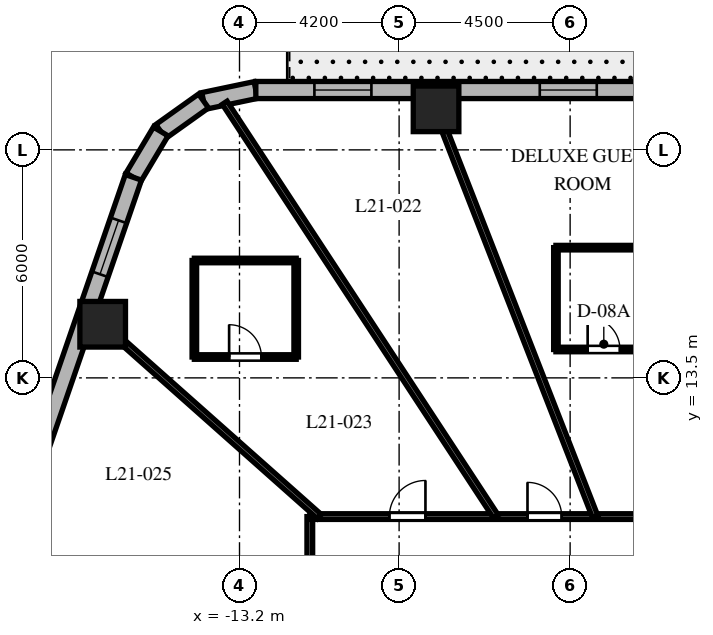
"""IFC4 building model, lengths in metres.
Left out: names, types, materials, properties, quantities, classifications, styles, units other than length and angle.
Written with IfcOpenShell. Run it as: python <this file> out.ifc"""

import sys

from ifc_helpers import new_model, si_unit, direction, frame, frame_2d, origin, origin_2d, place, context, subcontext, project, spatial, rectangle, extrude, element, fill, save


model = new_model("IFC4")
c1 = context("Model", 3, precision=1e-05, world=origin(), true_north=direction((0.0, 1.0)))
c2 = subcontext(c1, "Body", "Model", "MODEL_VIEW")
j1 = project(units=[si_unit("LENGTHUNIT", "METRE"), si_unit("PLANEANGLEUNIT", "RADIAN")], contexts=[c1])
p1 = place(None, origin())
s1 = spatial("IfcSite", under=j1, at=p1, CompositionType="ELEMENT")
p2 = place(p1, origin())
s2 = spatial("IfcBuilding", under=s1, at=p2, CompositionType="ELEMENT")
p3 = place(p2, frame((0.0, 0.0, 91.4)))
s3 = spatial("IfcBuildingStorey", under=s2, at=p3, CompositionType="ELEMENT", Elevation=91.4)
for number, where, z_axis, x_axis in (
    (1, (-8.028, 20.58, 0.0), (0.0, 0.0, 1.0), (1.0, 0.0, 0.0)),
    (2, (-16.8, 14.911, 0.0), (0.0, 0.0, 1.0), (1.0, 0.0, 0.0)),
):
    element("IfcColumn", number, at=place(p3, frame(where, z_axis=z_axis, x_axis=x_axis)), inside=s3, PredefinedType="COLUMN", context=c2, shape_type="SweptSolid", body=[
        extrude(rectangle(XDim=1.2, YDim=1.2, at=origin_2d()), origin(), (0.0, 0.0, 1.0), 3.7),
    ])
p4 = place(p3, frame((-12.771, 21.075, 0.0), z_axis=(0.0, 0.0, 1.0), x_axis=(-0.97874281988, -0.205091424819, 0.0)))
e3 = element("IfcWall", 3, at=p4, inside=s3, PredefinedType="SOLIDWALL", context=c2, shape_type="SweptSolid", body=[
    extrude(rectangle(XDim=1.406, YDim=0.45, at=frame_2d((0.703, 0.0))), origin(), (0.0, 0.0, 1.0), 3.4),
])
p5 = place(p3, frame((-14.146, 20.787, 0.0), z_axis=(0.0, 0.0, 1.0), x_axis=(-0.814162929117, -0.580636482536, 0.0)))
e4 = element("IfcWall", 4, at=p5, inside=s3, PredefinedType="SOLIDWALL", context=c2, shape_type="SweptSolid", body=[
    extrude(rectangle(XDim=1.382, YDim=0.45, at=frame_2d((0.691, 0.0))), origin(), (0.0, 0.0, 1.0), 3.4),
])
p6 = place(p3, frame((-15.272, 19.984, 0.0), z_axis=(0.0, 0.0, 1.0), x_axis=(-0.512579347361, -0.858639862025, 0.0)))
e5 = element("IfcWall", 5, at=p6, inside=s3, PredefinedType="SOLIDWALL", context=c2, shape_type="SweptSolid", body=[
    extrude(rectangle(XDim=1.406, YDim=0.45, at=frame_2d((0.703, 0.0))), origin(), (0.0, 0.0, 1.0), 3.4),
])
p7 = place(p3, frame((11.012, 21.075, 0.0), z_axis=(0.0, 0.0, 1.0), x_axis=(-1.0, 0.0, 0.0)))
e6 = element("IfcWall", 6, at=p7, inside=s3, PredefinedType="SOLIDWALL", context=c2, shape_type="SweptSolid", body=[
    extrude(rectangle(XDim=23.782, YDim=0.45, at=frame_2d((11.891, 0.0))), origin(), (0.0, 0.0, 1.0), 3.4),
])
p8 = place(p7, frame((2.473, 0.0, 0.0)))
e7 = element("IfcOpeningElement", 7, at=p8, cuts=e6, PredefinedType="OPENING", context=c2, shape_type="SweptSolid", body=[
    extrude(rectangle(XDim=0.95, YDim=2.15, at=frame_2d((0.475, 1.075))), frame((0.0, 0.235, 0.0), z_axis=(0.0, -1.0, 0.0), x_axis=(1.0, 0.0, 0.0)), (0.0, 0.0, 1.0), 0.47),
])
p9 = place(p7, frame((8.244, 0.0, 0.8)))
e8 = element("IfcOpeningElement", 8, at=p9, cuts=e6, PredefinedType="OPENING", context=c2, shape_type="SweptSolid", body=[
    extrude(rectangle(XDim=1.5, YDim=1.8, at=frame_2d((0.75, 0.9))), frame((0.0, 0.235, 0.0), z_axis=(0.0, -1.0, 0.0), x_axis=(1.0, 0.0, 0.0)), (0.0, 0.0, 1.0), 0.47),
])
p10 = place(p7, frame((14.811, 0.0, 0.8)))
e9 = element("IfcOpeningElement", 9, at=p10, cuts=e6, PredefinedType="OPENING", context=c2, shape_type="SweptSolid", body=[
    extrude(rectangle(XDim=1.5, YDim=1.8, at=frame_2d((0.75, 0.9))), frame((0.0, 0.235, 0.0), z_axis=(0.0, -1.0, 0.0), x_axis=(1.0, 0.0, 0.0)), (0.0, 0.0, 1.0), 0.47),
])
p11 = place(p7, frame((20.741, 0.0, 0.8)))
e10 = element("IfcOpeningElement", 10, at=p11, cuts=e6, PredefinedType="OPENING", context=c2, shape_type="SweptSolid", body=[
    extrude(rectangle(XDim=1.5, YDim=1.8, at=frame_2d((0.75, 0.9))), frame((0.0, 0.235, 0.0), z_axis=(0.0, -1.0, 0.0), x_axis=(1.0, 0.0, 0.0)), (0.0, 0.0, 1.0), 0.47),
])
p12 = place(p3, frame((-15.992, 18.777, 0.0), z_axis=(0.0, 0.0, 1.0), x_axis=(-0.325606988926, -0.945505202927, 0.0)))
e11 = element("IfcWall", 11, at=p12, inside=s3, PredefinedType="SOLIDWALL", context=c2, shape_type="SweptSolid", body=[
    extrude(rectangle(XDim=19.669, YDim=0.45, at=frame_2d((9.835, 0.0))), origin(), (0.0, 0.0, 1.0), 3.4),
])
p13 = place(p12, frame((1.197, 0.0, 0.8)))
e12 = element("IfcOpeningElement", 12, at=p13, cuts=e11, PredefinedType="OPENING", context=c2, shape_type="SweptSolid", body=[
    extrude(rectangle(XDim=1.5, YDim=1.8, at=frame_2d((0.75, 0.9))), frame((0.0, 0.235, 0.0), z_axis=(0.0, -1.0, 0.0), x_axis=(1.0, 0.0, 0.0)), (0.0, 0.0, 1.0), 0.47),
])
p14 = place(p12, frame((9.03, 0.0, 0.8)))
e13 = element("IfcOpeningElement", 13, at=p14, cuts=e11, PredefinedType="OPENING", context=c2, shape_type="SweptSolid", body=[
    extrude(rectangle(XDim=1.5, YDim=1.8, at=frame_2d((0.75, 0.9))), frame((0.0, 0.235, 0.0), z_axis=(0.0, -1.0, 0.0), x_axis=(1.0, 0.0, 0.0)), (0.0, 0.0, 1.0), 0.47),
])
p15 = place(p12, frame((16.918, 0.0, 0.8)))
e14 = element("IfcOpeningElement", 14, at=p15, cuts=e11, PredefinedType="OPENING", context=c2, shape_type="SweptSolid", body=[
    extrude(rectangle(XDim=1.5, YDim=1.8, at=frame_2d((0.75, 0.9))), frame((0.0, 0.235, 0.0), z_axis=(0.0, -1.0, 0.0), x_axis=(1.0, 0.0, 0.0)), (0.0, 0.0, 1.0), 0.47),
])
p16 = place(p3, frame((-11.35, -9.85, 0.0), z_axis=(0.0, 0.0, 1.0), x_axis=(0.0, 1.0, 0.0)))
e15 = element("IfcWall", 15, at=p16, inside=s3, PredefinedType="PARTITIONING", context=c2, shape_type="SweptSolid", body=[
    extrude(rectangle(XDim=19.7, YDim=0.15, at=frame_2d((9.85, 0.0))), origin(), (0.0, 0.0, 1.0), 2.84),
])
p17 = place(p16, frame((15.205, 0.0, 0.0)))
e16 = element("IfcOpeningElement", 16, at=p17, cuts=e15, PredefinedType="OPENING", context=c2, shape_type="SweptSolid", body=[
    extrude(rectangle(XDim=0.95, YDim=2.03, at=frame_2d((0.475, 1.015))), frame((0.0, 0.085, 0.0), z_axis=(0.0, -1.0, 0.0), x_axis=(1.0, 0.0, 0.0)), (0.0, 0.0, 1.0), 0.17),
])
p18 = place(p16, frame((8.836, 0.0, 0.0)))
e17 = element("IfcOpeningElement", 17, at=p18, cuts=e15, PredefinedType="OPENING", context=c2, shape_type="SweptSolid", body=[
    extrude(rectangle(XDim=0.95, YDim=2.03, at=frame_2d((0.475, 1.015))), frame((0.0, 0.085, 0.0), z_axis=(0.0, -1.0, 0.0), x_axis=(1.0, 0.0, 0.0)), (0.0, 0.0, 1.0), 0.17),
])
p19 = place(p16, frame((4.714, 0.0, 0.0)))
e18 = element("IfcOpeningElement", 18, at=p19, cuts=e15, PredefinedType="OPENING", context=c2, shape_type="SweptSolid", body=[
    extrude(rectangle(XDim=0.9, YDim=2.03, at=frame_2d((0.45, 1.015))), frame((0.0, 0.085, 0.0), z_axis=(0.0, -1.0, 0.0), x_axis=(1.0, 0.0, 0.0)), (0.0, 0.0, 1.0), 0.17),
])
p20 = place(p16, frame((1.462, 0.0, 0.0)))
e19 = element("IfcOpeningElement", 19, at=p20, cuts=e15, PredefinedType="OPENING", context=c2, shape_type="SweptSolid", body=[
    extrude(rectangle(XDim=0.95, YDim=2.03, at=frame_2d((0.475, 1.015))), frame((0.0, 0.085, 0.0), z_axis=(0.0, -1.0, 0.0), x_axis=(1.0, 0.0, 0.0)), (0.0, 0.0, 1.0), 0.17),
])
p21 = place(p3, frame((-11.35, 9.85, 0.0), z_axis=(0.0, 0.0, 1.0), x_axis=(1.0, 0.0, 0.0)))
e20 = element("IfcWall", 20, at=p21, inside=s3, PredefinedType="PARTITIONING", context=c2, shape_type="SweptSolid", body=[
    extrude(rectangle(XDim=22.7, YDim=0.15, at=frame_2d((11.35, 0.0))), origin(), (0.0, 0.0, 1.0), 2.84),
])
p22 = place(p21, frame((18.679, 0.0, 0.0)))
e21 = element("IfcOpeningElement", 21, at=p22, cuts=e20, PredefinedType="OPENING", context=c2, shape_type="SweptSolid", body=[
    extrude(rectangle(XDim=0.9, YDim=2.03, at=frame_2d((0.45, 1.015))), frame((0.0, 0.085, 0.0), z_axis=(0.0, -1.0, 0.0), x_axis=(1.0, 0.0, 0.0)), (0.0, 0.0, 1.0), 0.17),
])
p23 = place(p21, frame((15.337, 0.0, 0.0)))
e22 = element("IfcOpeningElement", 22, at=p23, cuts=e20, PredefinedType="OPENING", context=c2, shape_type="SweptSolid", body=[
    extrude(rectangle(XDim=0.9, YDim=2.03, at=frame_2d((0.45, 1.015))), frame((0.0, 0.085, 0.0), z_axis=(0.0, -1.0, 0.0), x_axis=(1.0, 0.0, 0.0)), (0.0, 0.0, 1.0), 0.17),
])
p24 = place(p21, frame((11.994, 0.0, 0.0)))
e23 = element("IfcOpeningElement", 23, at=p24, cuts=e20, PredefinedType="OPENING", context=c2, shape_type="SweptSolid", body=[
    extrude(rectangle(XDim=0.95, YDim=2.03, at=frame_2d((0.475, 1.015))), frame((0.0, 0.085, 0.0), z_axis=(0.0, -1.0, 0.0), x_axis=(1.0, 0.0, 0.0)), (0.0, 0.0, 1.0), 0.17),
])
p25 = place(p21, frame((8.559, 0.0, 0.0)))
e24 = element("IfcOpeningElement", 24, at=p25, cuts=e20, PredefinedType="OPENING", context=c2, shape_type="SweptSolid", body=[
    extrude(rectangle(XDim=0.95, YDim=2.03, at=frame_2d((0.475, 1.015))), frame((0.0, 0.085, 0.0), z_axis=(0.0, -1.0, 0.0), x_axis=(1.0, 0.0, 0.0)), (0.0, 0.0, 1.0), 0.17),
])
p26 = place(p21, frame((5.728, 0.0, 0.0)))
e25 = element("IfcOpeningElement", 25, at=p26, cuts=e20, PredefinedType="OPENING", context=c2, shape_type="SweptSolid", body=[
    extrude(rectangle(XDim=0.9, YDim=2.03, at=frame_2d((0.45, 1.015))), frame((0.0, 0.085, 0.0), z_axis=(0.0, -1.0, 0.0), x_axis=(1.0, 0.0, 0.0)), (0.0, 0.0, 1.0), 0.17),
])
p27 = place(p21, frame((2.093, 0.0, 0.0)))
e26 = element("IfcOpeningElement", 26, at=p27, cuts=e20, PredefinedType="OPENING", context=c2, shape_type="SweptSolid", body=[
    extrude(rectangle(XDim=0.95, YDim=2.03, at=frame_2d((0.475, 1.015))), frame((0.0, 0.085, 0.0), z_axis=(0.0, -1.0, 0.0), x_axis=(1.0, 0.0, 0.0)), (0.0, 0.0, 1.0), 0.17),
])
p28 = place(p3, frame((-3.842, 9.85, 0.0), z_axis=(0.0, 0.0, 1.0), x_axis=(-0.363432685593, 0.931620460833, 0.0)))
e27 = element("IfcWall", 27, at=p28, inside=s3, PredefinedType="PARTITIONING", context=c2, shape_type="SweptSolid", body=[
    extrude(rectangle(XDim=12.049, YDim=0.15, at=frame_2d((6.024, 0.0))), origin(), (0.0, 0.0, 1.0), 2.54),
])
p29 = place(p3, frame((-6.454, 9.85, 0.0), z_axis=(0.0, 0.0, 1.0), x_axis=(-0.548052950111, 0.836443640584, 0.0)))
e28 = element("IfcWall", 28, at=p29, inside=s3, PredefinedType="PARTITIONING", context=c2, shape_type="SweptSolid", body=[
    extrude(rectangle(XDim=13.019, YDim=0.15, at=frame_2d((6.51, 0.0))), origin(), (0.0, 0.0, 1.0), 2.54),
])
p30 = place(p3, frame((-11.098, 9.85, 0.0), z_axis=(0.0, 0.0, 1.0), x_axis=(-0.747904295103, 0.663806572253, 0.0)))
e29 = element("IfcWall", 29, at=p30, inside=s3, PredefinedType="PARTITIONING", context=c2, shape_type="SweptSolid", body=[
    extrude(rectangle(XDim=8.16, YDim=0.15, at=frame_2d((4.08, 0.0))), origin(), (0.0, 0.0, 1.0), 2.54),
])
p31 = place(p3, frame((-4.874, 14.247, 0.0), z_axis=(0.0, 0.0, 1.0), x_axis=(1.0, 0.0, 0.0)))
e30 = element("IfcWall", 30, at=p31, inside=s3, PredefinedType="PARTITIONING", context=c2, shape_type="SweptSolid", body=[
    extrude(rectangle(XDim=2.52, YDim=0.12, at=frame_2d((1.26, 0.0))), origin(), (0.0, 0.0, 1.0), 3.4),
])
p32 = place(p31, frame((0.835, 0.0, 0.0)))
e31 = element("IfcOpeningElement", 31, at=p32, cuts=e30, PredefinedType="OPENING", context=c2, shape_type="SweptSolid", body=[
    extrude(rectangle(XDim=0.85, YDim=2.03, at=frame_2d((0.425, 1.015))), frame((0.0, 0.07, 0.0), z_axis=(0.0, -1.0, 0.0), x_axis=(1.0, 0.0, 0.0)), (0.0, 0.0, 1.0), 0.14),
])
p33 = place(p3, frame((-2.354, 16.927, 0.0), z_axis=(0.0, 0.0, 1.0), x_axis=(-1.0, 0.0, 0.0)))
e32 = element("IfcWall", 32, at=p33, inside=s3, PredefinedType="PARTITIONING", context=c2, shape_type="SweptSolid", body=[
    extrude(rectangle(XDim=2.52, YDim=0.12, at=frame_2d((1.26, 0.0))), origin(), (0.0, 0.0, 1.0), 3.4),
])
p34 = place(p3, frame((-4.874, 16.927, 0.0), z_axis=(0.0, 0.0, 1.0), x_axis=(0.0, -1.0, 0.0)))
e33 = element("IfcWall", 33, at=p34, inside=s3, PredefinedType="PARTITIONING", context=c2, shape_type="SweptSolid", body=[
    extrude(rectangle(XDim=2.68, YDim=0.12, at=frame_2d((1.34, 0.0))), origin(), (0.0, 0.0, 1.0), 2.841),
])
p35 = place(p3, frame((-14.388, 14.049, 0.0), z_axis=(0.0, 0.0, 1.0), x_axis=(1.0, 0.0, 0.0)))
e34 = element("IfcWall", 34, at=p35, inside=s3, PredefinedType="PARTITIONING", context=c2, shape_type="SweptSolid", body=[
    extrude(rectangle(XDim=2.68, YDim=0.12, at=frame_2d((1.34, 0.0))), origin(), (0.0, 0.0, 1.0), 2.927),
])
p36 = place(p35, frame((0.915, 0.0, 0.0)))
e35 = element("IfcOpeningElement", 35, at=p36, cuts=e34, PredefinedType="OPENING", context=c2, shape_type="SweptSolid", body=[
    extrude(rectangle(XDim=0.85, YDim=2.03, at=frame_2d((0.425, 1.015))), frame((0.0, 0.07, 0.0), z_axis=(0.0, -1.0, 0.0), x_axis=(1.0, 0.0, 0.0)), (0.0, 0.0, 1.0), 0.14),
])
p37 = place(p3, frame((-11.708, 14.049, 0.0), z_axis=(0.0, 0.0, 1.0), x_axis=(0.0, 1.0, 0.0)))
e36 = element("IfcWall", 36, at=p37, inside=s3, PredefinedType="PARTITIONING", context=c2, shape_type="SweptSolid", body=[
    extrude(rectangle(XDim=2.54, YDim=0.12, at=frame_2d((1.27, 0.0))), origin(), (0.0, 0.0, 1.0), 2.927),
])
p38 = place(p3, frame((-11.708, 16.589, 0.0), z_axis=(0.0, 0.0, 1.0), x_axis=(-1.0, 0.0, 0.0)))
e37 = element("IfcWall", 37, at=p38, inside=s3, PredefinedType="PARTITIONING", context=c2, shape_type="SweptSolid", body=[
    extrude(rectangle(XDim=2.68, YDim=0.12, at=frame_2d((1.34, 0.0))), origin(), (0.0, 0.0, 1.0), 2.54),
])
p39 = place(p3, frame((-14.388, 16.589, 0.0), z_axis=(0.0, 0.0, 1.0), x_axis=(0.0, -1.0, 0.0)))
e38 = element("IfcWall", 38, at=p39, inside=s3, PredefinedType="PARTITIONING", context=c2, shape_type="SweptSolid", body=[
    extrude(rectangle(XDim=2.54, YDim=0.12, at=frame_2d((1.27, 0.0))), origin(), (0.0, 0.0, 1.0), 2.54),
])
p40 = place(p10, origin())
e39 = element("IfcWindow", 39, at=p40, inside=s3, PartitioningType="SINGLE_PANEL", PredefinedType="WINDOW", context=c2, shape_type="SweptSolid", body=[
    extrude(rectangle(XDim=1.5, YDim=1.8, at=frame_2d((0.75, 0.9))), frame((0.0, 0.03, 0.0), z_axis=(0.0, -1.0, 0.0), x_axis=(1.0, 0.0, 0.0)), (0.0, 0.0, 1.0), 0.06),
])
fill(e9, e39)
p41 = place(p11, origin())
e40 = element("IfcWindow", 40, at=p41, inside=s3, PartitioningType="SINGLE_PANEL", PredefinedType="WINDOW", context=c2, shape_type="SweptSolid", body=[
    extrude(rectangle(XDim=1.5, YDim=1.8, at=frame_2d((0.75, 0.9))), frame((0.0, 0.03, 0.0), z_axis=(0.0, -1.0, 0.0), x_axis=(1.0, 0.0, 0.0)), (0.0, 0.0, 1.0), 0.06),
])
fill(e10, e40)
p42 = place(p13, origin())
e41 = element("IfcWindow", 41, at=p42, inside=s3, PartitioningType="SINGLE_PANEL", PredefinedType="WINDOW", context=c2, shape_type="SweptSolid", body=[
    extrude(rectangle(XDim=1.5, YDim=1.8, at=frame_2d((0.75, 0.9))), frame((0.0, 0.03, 0.0), z_axis=(0.0, -1.0, 0.0), x_axis=(1.0, 0.0, 0.0)), (0.0, 0.0, 1.0), 0.06),
])
fill(e12, e41)
p43 = place(p32, origin())
e42 = element("IfcDoor", 42, at=p43, inside=s3, OperationType="SINGLE_SWING_LEFT", PredefinedType="DOOR", context=c2, shape_type="SweptSolid", body=[
    extrude(rectangle(XDim=0.85, YDim=2.03, at=frame_2d((0.425, 1.015))), frame((0.0, 0.025, 0.0), z_axis=(0.0, -1.0, 0.0), x_axis=(1.0, 0.0, 0.0)), (0.0, 0.0, 1.0), 0.05),
])
fill(e31, e42)
p44 = place(p26, origin())
e43 = element("IfcDoor", 43, at=p44, inside=s3, OperationType="SINGLE_SWING_LEFT", PredefinedType="DOOR", context=c2, shape_type="SweptSolid", body=[
    extrude(rectangle(XDim=0.9, YDim=2.03, at=frame_2d((0.45, 1.015))), frame((0.0, 0.025, 0.0), z_axis=(0.0, -1.0, 0.0), x_axis=(1.0, 0.0, 0.0)), (0.0, 0.0, 1.0), 0.05),
])
fill(e25, e43)
p45 = place(p27, origin())
e44 = element("IfcDoor", 44, at=p45, inside=s3, OperationType="SINGLE_SWING_RIGHT", PredefinedType="DOOR", context=c2, shape_type="SweptSolid", body=[
    extrude(rectangle(XDim=0.95, YDim=2.03, at=frame_2d((0.475, 1.015))), frame((0.0, 0.025, 0.0), z_axis=(0.0, -1.0, 0.0), x_axis=(1.0, 0.0, 0.0)), (0.0, 0.0, 1.0), 0.05),
])
fill(e26, e44)
p46 = place(p36, origin())
e45 = element("IfcDoor", 45, at=p46, inside=s3, OperationType="SINGLE_SWING_LEFT", PredefinedType="DOOR", context=c2, shape_type="SweptSolid", body=[
    extrude(rectangle(XDim=0.85, YDim=2.03, at=frame_2d((0.425, 1.015))), frame((0.0, 0.025, 0.0), z_axis=(0.0, -1.0, 0.0), x_axis=(1.0, 0.0, 0.0)), (0.0, 0.0, 1.0), 0.05),
])
fill(e35, e45)
save(model, sys.argv[1])
